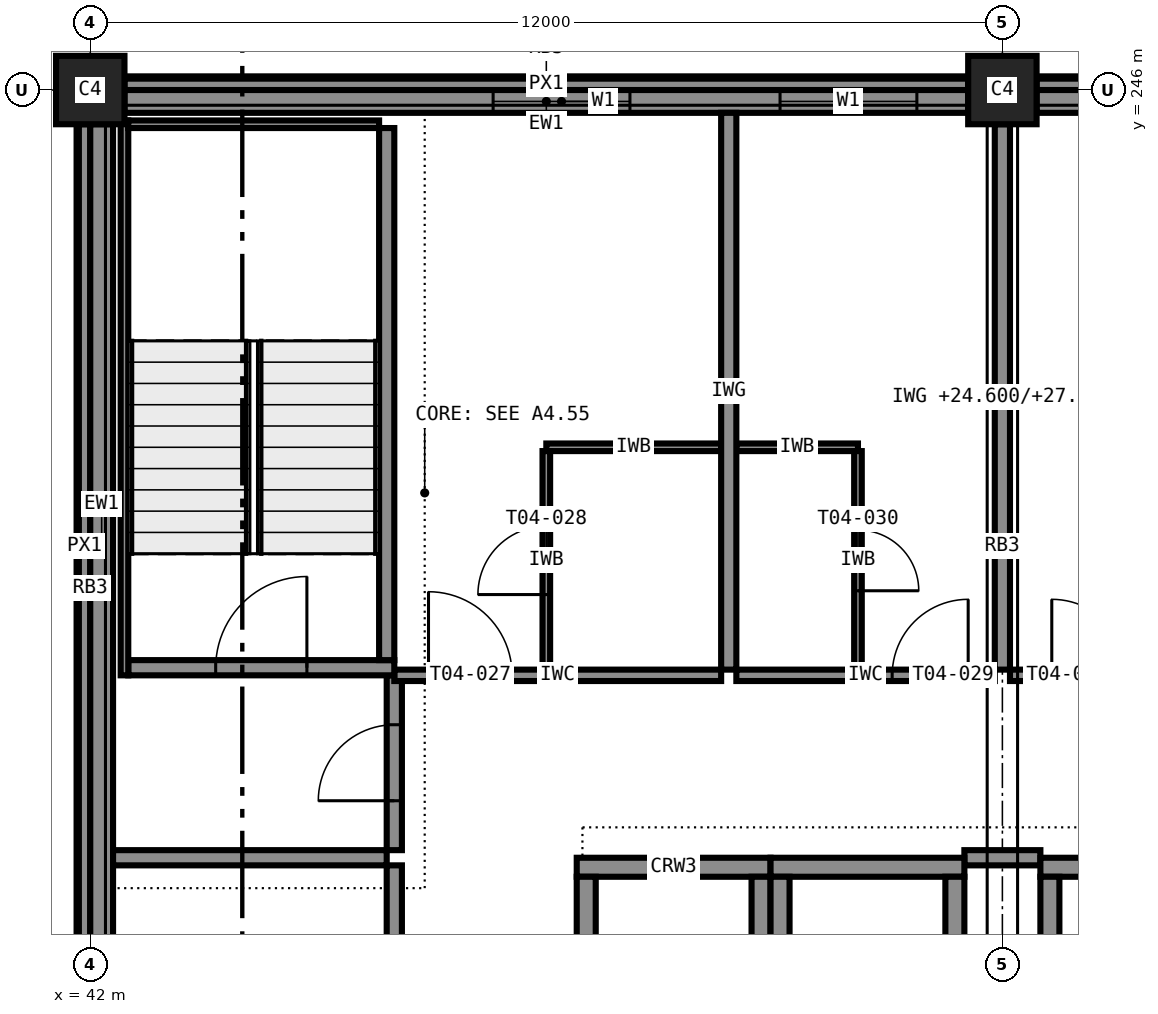
"""IFC4 building model, lengths in metres.
Left out: names, types, materials, properties, quantities, classifications, styles, units other than length and angle.
Written with IfcOpenShell. Run it as: python <this file> out.ifc"""

import sys

from ifc_helpers import new_model, si_unit, direction, frame, frame_2d, origin, origin_2d, place, context, subcontext, project, spatial, rectangle, extrude, element, fill, save


model = new_model("IFC4")
c1 = context("Model", 3, precision=1e-05, world=origin(), true_north=direction((0.0, 1.0)))
c2 = subcontext(c1, "Body", "Model", "MODEL_VIEW")
j1 = project(units=[si_unit("LENGTHUNIT", "METRE"), si_unit("PLANEANGLEUNIT", "RADIAN")], contexts=[c1])
p1 = place(None, origin())
s1 = spatial("IfcSite", under=j1, at=p1, CompositionType="ELEMENT")
p2 = place(p1, origin())
s2 = spatial("IfcBuilding", under=s1, at=p2, CompositionType="ELEMENT")
p3 = place(p2, frame((0.0, 0.0, 24.6)))
s3 = spatial("IfcBuildingStorey", under=s2, at=p3, CompositionType="ELEMENT", Elevation=24.6)
for number, where, z_axis, x_axis in (
    (1, (42.0, 246.0, 0.0), (0.0, 0.0, 1.0), (1.0, 0.0, 0.0)),
    (2, (54.0, 246.0, 0.0), (0.0, 0.0, 1.0), (1.0, 0.0, 0.0)),
):
    element("IfcColumn", number, at=place(p3, frame(where, z_axis=z_axis, x_axis=x_axis)), inside=s3, PredefinedType="COLUMN", context=c2, shape_type="SweptSolid", body=[
        extrude(rectangle(XDim=0.9, YDim=0.9, at=origin_2d()), origin(), (0.0, 0.0, 1.0), 3.6),
    ])
p4 = place(p3, frame((54.5, 235.775, 0.0), z_axis=(0.0, 0.0, 1.0), x_axis=(1.0, 0.0, 0.0)))
e3 = element("IfcWall", 3, at=p4, inside=s3, PredefinedType="SHEAR", context=c2, shape_type="SweptSolid", body=[
    extrude(rectangle(XDim=3.0, YDim=0.25, at=frame_2d((1.5, 0.0))), origin(), (0.0, 0.0, 1.0), 3.6),
])
p5 = place(p3, frame((54.625, 232.35, 0.0), z_axis=(0.0, 0.0, 1.0), x_axis=(0.0, 1.0, 0.0)))
e4 = element("IfcWall", 4, at=p5, inside=s3, PredefinedType="SHEAR", context=c2, shape_type="SweptSolid", body=[
    extrude(rectangle(XDim=3.3, YDim=0.25, at=frame_2d((1.65, 0.0))), origin(), (0.0, 0.0, 1.0), 3.6),
])
p6 = place(p3, frame((48.4, 235.775, 0.0), z_axis=(0.0, 0.0, 1.0), x_axis=(1.0, 0.0, 0.0)))
e5 = element("IfcWall", 5, at=p6, inside=s3, PredefinedType="SHEAR", context=c2, shape_type="SweptSolid", body=[
    extrude(rectangle(XDim=2.55, YDim=0.25, at=frame_2d((1.275, 0.0))), origin(), (0.0, 0.0, 1.0), 3.6),
])
for number, where, z_axis, x_axis in (
    (6, (48.525, 232.35, 0.0), (0.0, 0.0, 1.0), (0.0, 1.0, 0.0)),
    (7, (50.825, 232.35, 0.0), (0.0, 0.0, 1.0), (0.0, 1.0, 0.0)),
):
    element("IfcWall", number, at=place(p3, frame(where, z_axis=z_axis, x_axis=x_axis)), inside=s3, PredefinedType="SHEAR", context=c2, shape_type="SweptSolid", body=[
        extrude(rectangle(XDim=3.3, YDim=0.25, at=frame_2d((1.65, 0.0))), origin(), (0.0, 0.0, 1.0), 3.6),
    ])
p7 = place(p3, frame((50.95, 235.775, 0.0), z_axis=(0.0, 0.0, 1.0), x_axis=(1.0, 0.0, 0.0)))
e8 = element("IfcWall", 8, at=p7, inside=s3, PredefinedType="SHEAR", context=c2, shape_type="SweptSolid", body=[
    extrude(rectangle(XDim=2.55, YDim=0.25, at=frame_2d((1.275, 0.0))), origin(), (0.0, 0.0, 1.0), 3.6),
])
for number, where, z_axis, x_axis in (
    (9, (51.075, 232.35, 0.0), (0.0, 0.0, 1.0), (0.0, 1.0, 0.0)),
    (10, (53.375, 232.35, 0.0), (0.0, 0.0, 1.0), (0.0, 1.0, 0.0)),
):
    element("IfcWall", number, at=place(p3, frame(where, z_axis=z_axis, x_axis=x_axis)), inside=s3, PredefinedType="SHEAR", context=c2, shape_type="SweptSolid", body=[
        extrude(rectangle(XDim=3.3, YDim=0.25, at=frame_2d((1.65, 0.0))), origin(), (0.0, 0.0, 1.0), 3.6),
    ])
p8 = place(p3, frame((42.5, 238.4, 0.0), z_axis=(0.0, 0.0, 1.0), x_axis=(1.0, 0.0, 0.0)))
e11 = element("IfcWall", 11, at=p8, inside=s3, PredefinedType="SHEAR", context=c2, shape_type="SweptSolid", body=[
    extrude(rectangle(XDim=3.5, YDim=0.2, at=frame_2d((1.75, 0.0))), origin(), (0.0, 0.0, 1.0), 3.6),
])
p9 = place(p8, frame((1.15, 0.0, 0.0)))
e12 = element("IfcOpeningElement", 12, at=p9, cuts=e11, PredefinedType="OPENING", context=c2, shape_type="SweptSolid", body=[
    extrude(rectangle(XDim=1.2, YDim=2.1, at=frame_2d((0.6, 1.05))), frame((0.0, 0.11, 0.0), z_axis=(0.0, -1.0, 0.0), x_axis=(1.0, 0.0, 0.0)), (0.0, 0.0, 1.0), 0.22),
])
p10 = place(p3, frame((45.9, 238.5, 0.0), z_axis=(0.0, 0.0, 1.0), x_axis=(0.0, 1.0, 0.0)))
e13 = element("IfcWall", 13, at=p10, inside=s3, PredefinedType="SHEAR", context=c2, shape_type="SweptSolid", body=[
    extrude(rectangle(XDim=7.0, YDim=0.2, at=frame_2d((3.5, 0.0))), origin(), (0.0, 0.0, 1.0), 3.6),
])
p11 = place(p3, frame((42.45, 238.3, 0.0), z_axis=(0.0, 0.0, 1.0), x_axis=(0.0, 1.0, 0.0)))
e14 = element("IfcWall", 14, at=p11, inside=s3, PredefinedType="SHEAR", context=c2, shape_type="SweptSolid", body=[
    extrude(rectangle(XDim=7.3, YDim=0.1, at=frame_2d((3.65, 0.0))), origin(), (0.0, 0.0, 1.0), 3.4),
])
p12 = place(p3, frame((42.5, 245.55, 0.0), z_axis=(0.0, 0.0, 1.0), x_axis=(1.0, 0.0, 0.0)))
e15 = element("IfcWall", 15, at=p12, inside=s3, PredefinedType="SHEAR", context=c2, shape_type="SweptSolid", body=[
    extrude(rectangle(XDim=3.3, YDim=0.1, at=frame_2d((1.65, 0.0))), origin(), (0.0, 0.0, 1.0), 3.4),
])
p13 = place(p3, frame((65.55, 245.85, 0.0), z_axis=(0.0, 0.0, 1.0), x_axis=(-1.0, 0.0, 0.0)))
e16 = element("IfcWall", 16, at=p13, inside=s3, PredefinedType="STANDARD", context=c2, shape_type="SweptSolid", body=[
    extrude(rectangle(XDim=11.1, YDim=0.3, at=frame_2d((5.55, 0.0))), origin(), (0.0, 0.0, 1.0), 2.6),
])
p14 = place(p13, frame((8.425, 0.0, 0.85)))
e17 = element("IfcOpeningElement", 17, at=p14, cuts=e16, PredefinedType="OPENING", context=c2, shape_type="SweptSolid", body=[
    extrude(rectangle(XDim=1.8, YDim=1.75, at=frame_2d((0.9, 0.875))), frame((0.0, 0.16, 0.0), z_axis=(0.0, -1.0, 0.0), x_axis=(1.0, 0.0, 0.0)), (0.0, 0.0, 1.0), 0.32),
])
p15 = place(p13, frame((4.65, 0.0, 0.85)))
e18 = element("IfcOpeningElement", 18, at=p15, cuts=e16, PredefinedType="OPENING", context=c2, shape_type="SweptSolid", body=[
    extrude(rectangle(XDim=1.8, YDim=1.75, at=frame_2d((0.9, 0.875))), frame((0.0, 0.16, 0.0), z_axis=(0.0, -1.0, 0.0), x_axis=(1.0, 0.0, 0.0)), (0.0, 0.0, 1.0), 0.32),
])
p16 = place(p13, frame((0.875, 0.0, 0.85)))
e19 = element("IfcOpeningElement", 19, at=p16, cuts=e16, PredefinedType="OPENING", context=c2, shape_type="SweptSolid", body=[
    extrude(rectangle(XDim=1.8, YDim=1.75, at=frame_2d((0.9, 0.875))), frame((0.0, 0.16, 0.0), z_axis=(0.0, -1.0, 0.0), x_axis=(1.0, 0.0, 0.0)), (0.0, 0.0, 1.0), 0.32),
])
p17 = place(p3, frame((53.55, 245.85, 0.0), z_axis=(0.0, 0.0, 1.0), x_axis=(-1.0, 0.0, 0.0)))
e20 = element("IfcWall", 20, at=p17, inside=s3, PredefinedType="STANDARD", context=c2, shape_type="SweptSolid", body=[
    extrude(rectangle(XDim=11.1, YDim=0.3, at=frame_2d((5.55, 0.0))), origin(), (0.0, 0.0, 1.0), 2.6),
])
p18 = place(p17, frame((4.45, 0.0, 0.85)))
e21 = element("IfcOpeningElement", 21, at=p18, cuts=e20, PredefinedType="OPENING", context=c2, shape_type="SweptSolid", body=[
    extrude(rectangle(XDim=1.8, YDim=1.75, at=frame_2d((0.9, 0.875))), frame((0.0, 0.16, 0.0), z_axis=(0.0, -1.0, 0.0), x_axis=(1.0, 0.0, 0.0)), (0.0, 0.0, 1.0), 0.32),
])
p19 = place(p17, frame((0.675, 0.0, 0.85)))
e22 = element("IfcOpeningElement", 22, at=p19, cuts=e20, PredefinedType="OPENING", context=c2, shape_type="SweptSolid", body=[
    extrude(rectangle(XDim=1.8, YDim=1.75, at=frame_2d((0.9, 0.875))), frame((0.0, 0.16, 0.0), z_axis=(0.0, -1.0, 0.0), x_axis=(1.0, 0.0, 0.0)), (0.0, 0.0, 1.0), 0.32),
])
for number, where, z_axis, x_axis in (
    (23, (65.55, 246.075, 3.4), (0.0, 0.0, 1.0), (-1.0, 0.0, 0.0)),
    (24, (53.55, 246.075, 3.4), (0.0, 0.0, 1.0), (-1.0, 0.0, 0.0)),
):
    element("IfcWall", number, at=place(p3, frame(where, z_axis=z_axis, x_axis=x_axis)), inside=s3, PredefinedType="STANDARD", context=c2, shape_type="SweptSolid", body=[
        extrude(rectangle(XDim=11.1, YDim=0.15, at=frame_2d((5.55, 0.0))), origin(), (0.0, 0.0, 1.0), 0.2),
    ])
p20 = place(p3, frame((42.15, 245.55, 0.0), z_axis=(0.0, 0.0, 1.0), x_axis=(0.0, -1.0, 0.0)))
e25 = element("IfcWall", 25, at=p20, inside=s3, PredefinedType="STANDARD", context=c2, shape_type="SweptSolid", body=[
    extrude(rectangle(XDim=11.1, YDim=0.3, at=frame_2d((5.55, 0.0))), origin(), (0.0, 0.0, 1.0), 2.6),
])
p21 = place(p3, frame((41.925, 245.55, 3.4), z_axis=(0.0, 0.0, 1.0), x_axis=(0.0, -1.0, 0.0)))
e26 = element("IfcWall", 26, at=p21, inside=s3, PredefinedType="STANDARD", context=c2, shape_type="SweptSolid", body=[
    extrude(rectangle(XDim=11.1, YDim=0.15, at=frame_2d((5.55, 0.0))), origin(), (0.0, 0.0, 1.0), 0.2),
])
p22 = place(p3, frame((42.3, 235.9, 0.0), z_axis=(0.0, 0.0, 1.0), x_axis=(1.0, 0.0, 0.0)))
e27 = element("IfcWall", 27, at=p22, inside=s3, PredefinedType="PARTITIONING", context=c2, shape_type="SweptSolid", body=[
    extrude(rectangle(XDim=3.6, YDim=0.2, at=frame_2d((1.8, 0.0))), origin(), (0.0, 0.0, 1.0), 3.4),
])
p23 = place(p3, frame((53.5, 235.9, 0.0), z_axis=(0.0, 0.0, 1.0), x_axis=(1.0, 0.0, 0.0)))
e28 = element("IfcWall", 28, at=p23, inside=s3, PredefinedType="PARTITIONING", context=c2, shape_type="SweptSolid", body=[
    extrude(rectangle(XDim=1.0, YDim=0.2, at=frame_2d((0.5, 0.0))), origin(), (0.0, 0.0, 1.0), 3.4),
])
p24 = place(p3, frame((46.0, 232.2, 0.0), z_axis=(0.0, 0.0, 1.0), x_axis=(0.0, 1.0, 0.0)))
e29 = element("IfcWall", 29, at=p24, inside=s3, PredefinedType="PARTITIONING", context=c2, shape_type="SweptSolid", body=[
    extrude(rectangle(XDim=3.6, YDim=0.2, at=frame_2d((1.8, 0.0))), origin(), (0.0, 0.0, 1.0), 3.4),
])
p25 = place(p24, frame((1.35, 0.0, 0.0)))
e30 = element("IfcOpeningElement", 30, at=p25, cuts=e29, PredefinedType="OPENING", context=c2, shape_type="SweptSolid", body=[
    extrude(rectangle(XDim=0.9, YDim=2.1, at=frame_2d((0.45, 1.05))), frame((0.0, 0.11, 0.0), z_axis=(0.0, -1.0, 0.0), x_axis=(1.0, 0.0, 0.0)), (0.0, 0.0, 1.0), 0.22),
])
p26 = place(p3, frame((46.0, 236.0, 0.0), z_axis=(0.0, 0.0, 1.0), x_axis=(0.0, 1.0, 0.0)))
e31 = element("IfcWall", 31, at=p26, inside=s3, PredefinedType="PARTITIONING", context=c2, shape_type="SweptSolid", body=[
    extrude(rectangle(XDim=2.3, YDim=0.2, at=frame_2d((1.15, 0.0))), origin(), (0.0, 0.0, 1.0), 3.4),
])
p27 = place(p26, frame((0.65, 0.0, 0.0)))
e32 = element("IfcOpeningElement", 32, at=p27, cuts=e31, PredefinedType="OPENING", context=c2, shape_type="SweptSolid", body=[
    extrude(rectangle(XDim=1.0, YDim=2.1, at=frame_2d((0.5, 1.05))), frame((0.0, 0.11, 0.0), z_axis=(0.0, -1.0, 0.0), x_axis=(1.0, 0.0, 0.0)), (0.0, 0.0, 1.0), 0.22),
])
p28 = place(p3, frame((46.0, 238.3, 0.0), z_axis=(0.0, 0.0, 1.0), x_axis=(1.0, 0.0, 0.0)))
e33 = element("IfcWall", 33, at=p28, inside=s3, PredefinedType="PARTITIONING", context=c2, shape_type="SweptSolid", body=[
    extrude(rectangle(XDim=4.3, YDim=0.15, at=frame_2d((2.15, 0.0))), origin(), (0.0, 0.0, 1.0), 3.4),
])
p29 = place(p28, frame((0.45, 0.0, 0.0)))
e34 = element("IfcOpeningElement", 34, at=p29, cuts=e33, PredefinedType="OPENING", context=c2, shape_type="SweptSolid", body=[
    extrude(rectangle(XDim=1.1, YDim=2.1, at=frame_2d((0.55, 1.05))), frame((0.0, 0.085, 0.0), z_axis=(0.0, -1.0, 0.0), x_axis=(1.0, 0.0, 0.0)), (0.0, 0.0, 1.0), 0.17),
])
p30 = place(p3, frame((48.0, 241.3, 0.0), z_axis=(0.0, 0.0, 1.0), x_axis=(1.0, 0.0, 0.0)))
e35 = element("IfcWall", 35, at=p30, inside=s3, PredefinedType="PARTITIONING", context=c2, shape_type="SweptSolid", body=[
    extrude(rectangle(XDim=2.3, YDim=0.1, at=frame_2d((1.15, 0.0))), origin(), (0.0, 0.0, 1.0), 3.4),
])
p31 = place(p3, frame((48.0, 238.375, 0.0), z_axis=(0.0, 0.0, 1.0), x_axis=(0.0, 1.0, 0.0)))
e36 = element("IfcWall", 36, at=p31, inside=s3, PredefinedType="PARTITIONING", context=c2, shape_type="SweptSolid", body=[
    extrude(rectangle(XDim=2.875, YDim=0.1, at=frame_2d((1.438, 0.0))), origin(), (0.0, 0.0, 1.0), 3.4),
])
p32 = place(p31, frame((0.988, 0.0, 0.0)))
e37 = element("IfcOpeningElement", 37, at=p32, cuts=e36, PredefinedType="OPENING", context=c2, shape_type="SweptSolid", body=[
    extrude(rectangle(XDim=0.9, YDim=2.1, at=frame_2d((0.45, 1.05))), frame((0.0, 0.06, 0.0), z_axis=(0.0, -1.0, 0.0), x_axis=(1.0, 0.0, 0.0)), (0.0, 0.0, 1.0), 0.12),
])
p33 = place(p3, frame((50.5, 238.3, 0.0), z_axis=(0.0, 0.0, 1.0), x_axis=(1.0, 0.0, 0.0)))
e38 = element("IfcWall", 38, at=p33, inside=s3, PredefinedType="PARTITIONING", context=c2, shape_type="SweptSolid", body=[
    extrude(rectangle(XDim=3.4, YDim=0.15, at=frame_2d((1.7, 0.0))), origin(), (0.0, 0.0, 1.0), 3.4),
])
p34 = place(p33, frame((2.05, 0.0, 0.0)))
e39 = element("IfcOpeningElement", 39, at=p34, cuts=e38, PredefinedType="OPENING", context=c2, shape_type="SweptSolid", body=[
    extrude(rectangle(XDim=1.0, YDim=2.1, at=frame_2d((0.5, 1.05))), frame((0.0, 0.085, 0.0), z_axis=(0.0, -1.0, 0.0), x_axis=(1.0, 0.0, 0.0)), (0.0, 0.0, 1.0), 0.17),
])
p35 = place(p3, frame((50.5, 241.3, 0.0), z_axis=(0.0, 0.0, 1.0), x_axis=(1.0, 0.0, 0.0)))
e40 = element("IfcWall", 40, at=p35, inside=s3, PredefinedType="PARTITIONING", context=c2, shape_type="SweptSolid", body=[
    extrude(rectangle(XDim=1.6, YDim=0.1, at=frame_2d((0.8, 0.0))), origin(), (0.0, 0.0, 1.0), 3.4),
])
p36 = place(p3, frame((52.1, 241.25, 0.0), z_axis=(0.0, 0.0, 1.0), x_axis=(0.0, -1.0, 0.0)))
e41 = element("IfcWall", 41, at=p36, inside=s3, PredefinedType="PARTITIONING", context=c2, shape_type="SweptSolid", body=[
    extrude(rectangle(XDim=2.875, YDim=0.1, at=frame_2d((1.438, 0.0))), origin(), (0.0, 0.0, 1.0), 3.4),
])
p37 = place(p36, frame((1.038, 0.0, 0.0)))
e42 = element("IfcOpeningElement", 42, at=p37, cuts=e41, PredefinedType="OPENING", context=c2, shape_type="SweptSolid", body=[
    extrude(rectangle(XDim=0.8, YDim=2.1, at=frame_2d((0.4, 1.05))), frame((0.0, 0.06, 0.0), z_axis=(0.0, -1.0, 0.0), x_axis=(1.0, 0.0, 0.0)), (0.0, 0.0, 1.0), 0.12),
])
p38 = place(p3, frame((54.1, 238.3, 0.0), z_axis=(0.0, 0.0, 1.0), x_axis=(1.0, 0.0, 0.0)))
e43 = element("IfcWall", 43, at=p38, inside=s3, PredefinedType="PARTITIONING", context=c2, shape_type="SweptSolid", body=[
    extrude(rectangle(XDim=3.8, YDim=0.15, at=frame_2d((1.9, 0.0))), origin(), (0.0, 0.0, 1.0), 3.4),
])
p39 = place(p38, frame((0.55, 0.0, 0.0)))
e44 = element("IfcOpeningElement", 44, at=p39, cuts=e43, PredefinedType="OPENING", context=c2, shape_type="SweptSolid", body=[
    extrude(rectangle(XDim=1.0, YDim=2.1, at=frame_2d((0.5, 1.05))), frame((0.0, 0.085, 0.0), z_axis=(0.0, -1.0, 0.0), x_axis=(1.0, 0.0, 0.0)), (0.0, 0.0, 1.0), 0.17),
])
p40 = place(p3, frame((50.4, 245.7, 0.0), z_axis=(0.0, 0.0, 1.0), x_axis=(0.0, -1.0, 0.0)))
e45 = element("IfcWall", 45, at=p40, inside=s3, PredefinedType="PARTITIONING", context=c2, shape_type="SweptSolid", body=[
    extrude(rectangle(XDim=7.325, YDim=0.2, at=frame_2d((3.663, 0.0))), origin(), (0.0, 0.0, 1.0), 3.4),
])
p41 = place(p3, frame((54.0, 245.55, 0.0), z_axis=(0.0, 0.0, 1.0), x_axis=(0.0, -1.0, 0.0)))
e46 = element("IfcWall", 46, at=p41, inside=s3, PredefinedType="PARTITIONING", context=c2, shape_type="SweptSolid", body=[
    extrude(rectangle(XDim=7.175, YDim=0.2, at=frame_2d((3.587, 0.0))), origin(), (0.0, 0.0, 1.0), 2.6),
])
p42 = place(p18, origin())
e47 = element("IfcWindow", 47, at=p42, inside=s3, PartitioningType="SINGLE_PANEL", PredefinedType="WINDOW", context=c2, shape_type="SweptSolid", body=[
    extrude(rectangle(XDim=1.8, YDim=1.75, at=frame_2d((0.9, 0.875))), frame((0.0, 0.03, 0.0), z_axis=(0.0, -1.0, 0.0), x_axis=(1.0, 0.0, 0.0)), (0.0, 0.0, 1.0), 0.06),
])
fill(e21, e47)
p43 = place(p19, origin())
e48 = element("IfcWindow", 48, at=p43, inside=s3, PartitioningType="SINGLE_PANEL", PredefinedType="WINDOW", context=c2, shape_type="SweptSolid", body=[
    extrude(rectangle(XDim=1.8, YDim=1.75, at=frame_2d((0.9, 0.875))), frame((0.0, 0.03, 0.0), z_axis=(0.0, -1.0, 0.0), x_axis=(1.0, 0.0, 0.0)), (0.0, 0.0, 1.0), 0.06),
])
fill(e22, e48)
p44 = place(p27, origin())
e49 = element("IfcDoor", 49, at=p44, inside=s3, OperationType="SINGLE_SWING_LEFT", PredefinedType="DOOR", context=c2, shape_type="SweptSolid", body=[
    extrude(rectangle(XDim=1.0, YDim=2.1, at=frame_2d((0.5, 1.05))), frame((0.0, 0.025, 0.0), z_axis=(0.0, -1.0, 0.0), x_axis=(1.0, 0.0, 0.0)), (0.0, 0.0, 1.0), 0.05),
])
fill(e32, e49)
p45 = place(p29, origin())
e50 = element("IfcDoor", 50, at=p45, inside=s3, OperationType="SINGLE_SWING_LEFT", PredefinedType="DOOR", context=c2, shape_type="SweptSolid", body=[
    extrude(rectangle(XDim=1.1, YDim=2.1, at=frame_2d((0.55, 1.05))), frame((0.0, 0.025, 0.0), z_axis=(0.0, -1.0, 0.0), x_axis=(1.0, 0.0, 0.0)), (0.0, 0.0, 1.0), 0.05),
])
fill(e34, e50)
p46 = place(p32, origin())
e51 = element("IfcDoor", 51, at=p46, inside=s3, OperationType="SINGLE_SWING_LEFT", PredefinedType="DOOR", context=c2, shape_type="SweptSolid", body=[
    extrude(rectangle(XDim=0.9, YDim=2.1, at=frame_2d((0.45, 1.05))), frame((0.0, 0.025, 0.0), z_axis=(0.0, -1.0, 0.0), x_axis=(1.0, 0.0, 0.0)), (0.0, 0.0, 1.0), 0.05),
])
fill(e37, e51)
p47 = place(p34, origin())
e52 = element("IfcDoor", 52, at=p47, inside=s3, OperationType="SINGLE_SWING_RIGHT", PredefinedType="DOOR", context=c2, shape_type="SweptSolid", body=[
    extrude(rectangle(XDim=1.0, YDim=2.1, at=frame_2d((0.5, 1.05))), frame((0.0, 0.025, 0.0), z_axis=(0.0, -1.0, 0.0), x_axis=(1.0, 0.0, 0.0)), (0.0, 0.0, 1.0), 0.05),
])
fill(e39, e52)
p48 = place(p37, origin())
e53 = element("IfcDoor", 53, at=p48, inside=s3, OperationType="SINGLE_SWING_RIGHT", PredefinedType="DOOR", context=c2, shape_type="SweptSolid", body=[
    extrude(rectangle(XDim=0.8, YDim=2.1, at=frame_2d((0.4, 1.05))), frame((0.0, 0.025, 0.0), z_axis=(0.0, -1.0, 0.0), x_axis=(1.0, 0.0, 0.0)), (0.0, 0.0, 1.0), 0.05),
])
fill(e42, e53)
p49 = place(p39, origin())
e54 = element("IfcDoor", 54, at=p49, inside=s3, OperationType="SINGLE_SWING_LEFT", PredefinedType="DOOR", context=c2, shape_type="SweptSolid", body=[
    extrude(rectangle(XDim=1.0, YDim=2.1, at=frame_2d((0.5, 1.05))), frame((0.0, 0.025, 0.0), z_axis=(0.0, -1.0, 0.0), x_axis=(1.0, 0.0, 0.0)), (0.0, 0.0, 1.0), 0.05),
])
fill(e44, e54)
p50 = place(p9, origin())
e55 = element("IfcDoor", 55, at=p50, inside=s3, OperationType="SINGLE_SWING_RIGHT", PredefinedType="DOOR", context=c2, shape_type="SweptSolid", body=[
    extrude(rectangle(XDim=1.2, YDim=2.1, at=frame_2d((0.6, 1.05))), frame((0.0, 0.025, 0.0), z_axis=(0.0, -1.0, 0.0), x_axis=(1.0, 0.0, 0.0)), (0.0, 0.0, 1.0), 0.05),
])
fill(e12, e55)
save(model, sys.argv[1])
